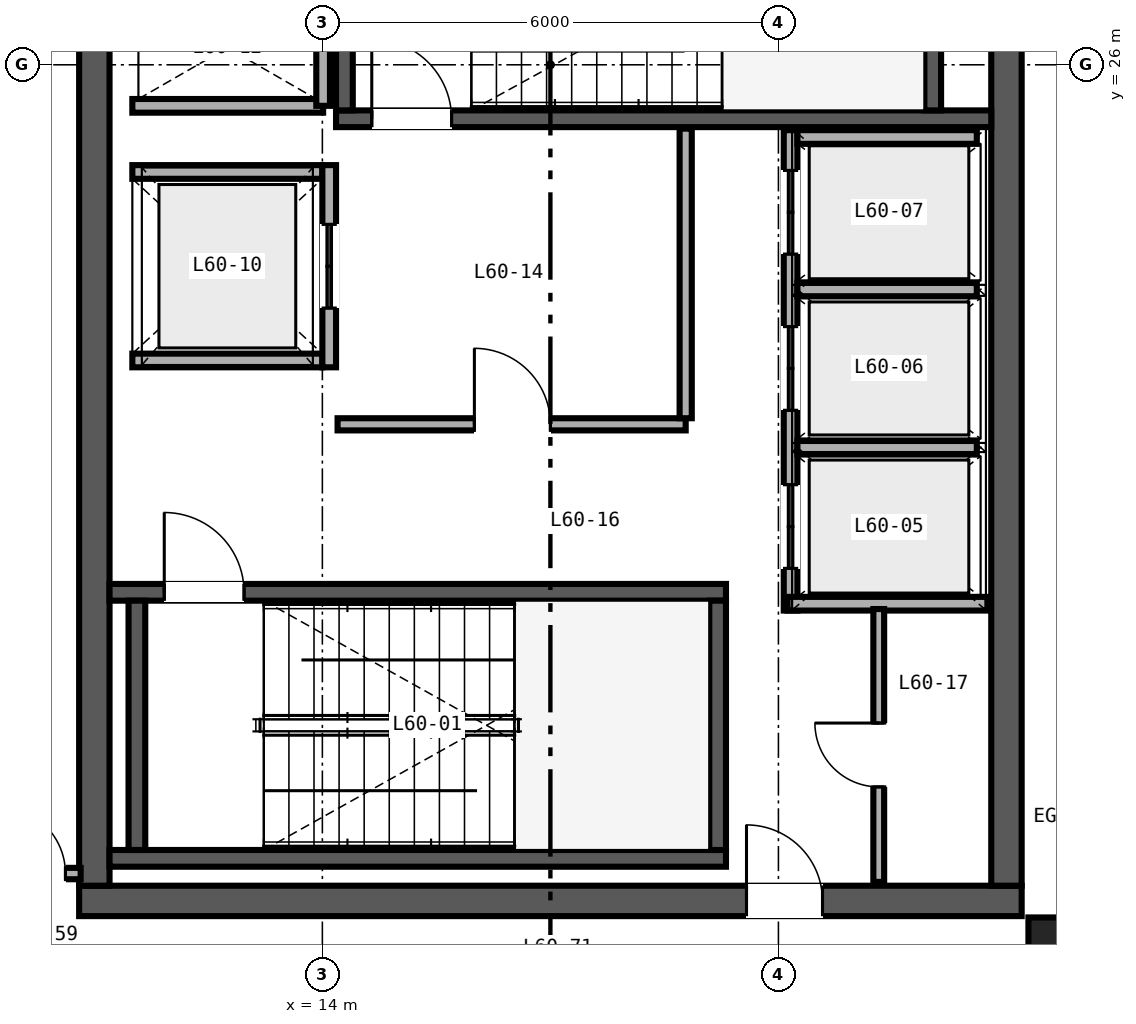
"""IFC4 building model, lengths in metres.
Left out: names, types, materials, properties, quantities, classifications, styles, units other than length and angle.
Written with IfcOpenShell. Run it as: python <this file> out.ifc"""

import sys

from ifc_helpers import new_model, si_unit, direction, frame, frame_2d, origin, origin_2d, place, context, subcontext, project, spatial, rectangle, i_section, extrude, source, transform, mapped, element, fill, save


model = new_model("IFC4")
c1 = context("Model", 3, precision=1e-05, world=origin(), true_north=direction((0.0, 1.0)))
c2 = subcontext(c1, "Body", "Model", "MODEL_VIEW")
j1 = project(units=[si_unit("LENGTHUNIT", "METRE"), si_unit("PLANEANGLEUNIT", "RADIAN")], contexts=[c1])
p1 = place(None, origin())
s1 = spatial("IfcSite", under=j1, at=p1, CompositionType="ELEMENT")
p2 = place(p1, origin())
s2 = spatial("IfcBuilding", under=s1, at=p2, CompositionType="ELEMENT")
p3 = place(p2, frame((0.0, 0.0, 240.0)))
s3 = spatial("IfcBuildingStorey", under=s2, at=p3, CompositionType="ELEMENT", Elevation=240.0)
p4 = place(p3, frame((10.8, 15.0, 0.0), z_axis=(0.0, 0.0, 1.0), x_axis=(1.0, 0.0, 0.0)))
e1 = element("IfcWall", 1, at=p4, inside=s3, PredefinedType="SHEAR", context=c2, shape_type="SweptSolid", body=[
    extrude(rectangle(XDim=12.4, YDim=0.4, at=frame_2d((6.2, 0.0))), origin(), (0.0, 0.0, 1.0), 3.38),
])
p5 = place(p4, frame((8.78, 0.0, 0.0)))
e2 = element("IfcOpeningElement", 2, at=p5, cuts=e1, PredefinedType="OPENING", context=c2, shape_type="SweptSolid", body=[
    extrude(rectangle(XDim=1.0, YDim=2.15, at=frame_2d((0.5, 1.075))), frame((0.0, 0.21, 0.0), z_axis=(0.0, -1.0, 0.0), x_axis=(1.0, 0.0, 0.0)), (0.0, 0.0, 1.0), 0.42),
])
for number, where, z_axis, x_axis in (
    (3, (11.0, 15.2, 0.0), (0.0, 0.0, 1.0), (0.0, 1.0, 0.0)),
    (4, (23.0, 15.2, 0.0), (0.0, 0.0, 1.0), (0.0, 1.0, 0.0)),
):
    element("IfcWall", number, at=place(p3, frame(where, z_axis=z_axis, x_axis=x_axis)), inside=s3, PredefinedType="SHEAR", context=c2, shape_type="SweptSolid", body=[
        extrude(rectangle(XDim=21.6, YDim=0.4, at=frame_2d((10.8, 0.0))), origin(), (0.0, 0.0, 1.0), 3.38),
    ])
p6 = place(p3, frame((11.2, 15.56, 0.0), z_axis=(0.0, 0.0, 1.0), x_axis=(1.0, 0.0, 0.0)))
e5 = element("IfcWall", 5, at=p6, inside=s3, PredefinedType="SHEAR", context=c2, shape_type="SweptSolid", body=[
    extrude(rectangle(XDim=8.11, YDim=0.22, at=frame_2d((4.055, 0.0))), origin(), (0.0, 0.0, 1.0), 3.4),
])
p7 = place(p3, frame((11.2, 19.06, 0.0), z_axis=(0.0, 0.0, 1.0), x_axis=(1.0, 0.0, 0.0)))
e6 = element("IfcWall", 6, at=p7, inside=s3, PredefinedType="SHEAR", context=c2, shape_type="SweptSolid", body=[
    extrude(rectangle(XDim=8.11, YDim=0.22, at=frame_2d((4.055, 0.0))), origin(), (0.0, 0.0, 1.0), 3.4),
])
p8 = place(p7, frame((0.72, 0.0, 0.0)))
e7 = element("IfcOpeningElement", 7, at=p8, cuts=e6, PredefinedType="OPENING", context=c2, shape_type="SweptSolid", body=[
    extrude(rectangle(XDim=1.05, YDim=2.15, at=frame_2d((0.525, 1.075))), frame((0.0, 0.12, 0.0), z_axis=(0.0, -1.0, 0.0), x_axis=(1.0, 0.0, 0.0)), (0.0, 0.0, 1.0), 0.24),
])
for number, where, z_axis, x_axis in (
    (8, (11.56, 15.67, 0.0), (0.0, 0.0, 1.0), (0.0, 1.0, 0.0)),
    (9, (19.2, 15.67, 0.0), (0.0, 0.0, 1.0), (0.0, 1.0, 0.0)),
):
    element("IfcWall", number, at=place(p3, frame(where, z_axis=z_axis, x_axis=x_axis)), inside=s3, PredefinedType="SHEAR", context=c2, shape_type="SweptSolid", body=[
        extrude(rectangle(XDim=3.28, YDim=0.22, at=frame_2d((1.64, 0.0))), origin(), (0.0, 0.0, 1.0), 3.4),
    ])
p9 = place(p3, frame((14.18, 25.29, 0.0), z_axis=(0.0, 0.0, 1.0), x_axis=(1.0, 0.0, 0.0)))
e10 = element("IfcWall", 10, at=p9, inside=s3, PredefinedType="SHEAR", context=c2, shape_type="SweptSolid", body=[
    extrude(rectangle(XDim=8.62, YDim=0.22, at=frame_2d((4.31, 0.0))), origin(), (0.0, 0.0, 1.0), 3.4),
])
p10 = place(p9, frame((0.47, 0.0, 0.0)))
e11 = element("IfcOpeningElement", 11, at=p10, cuts=e10, PredefinedType="OPENING", context=c2, shape_type="SweptSolid", body=[
    extrude(rectangle(XDim=1.05, YDim=2.15, at=frame_2d((0.525, 1.075))), frame((0.0, 0.12, 0.0), z_axis=(0.0, -1.0, 0.0), x_axis=(1.0, 0.0, 0.0)), (0.0, 0.0, 1.0), 0.24),
])
for number, where, z_axis, x_axis in (
    (12, (14.29, 25.4, 0.0), (0.0, 0.0, 1.0), (0.0, 1.0, 0.0)),
    (13, (22.03, 25.4, 0.0), (0.0, 0.0, 1.0), (0.0, 1.0, 0.0)),
):
    element("IfcWall", number, at=place(p3, frame(where, z_axis=z_axis, x_axis=x_axis)), inside=s3, PredefinedType="SHEAR", context=c2, shape_type="SweptSolid", body=[
        extrude(rectangle(XDim=3.28, YDim=0.22, at=frame_2d((1.64, 0.0))), origin(), (0.0, 0.0, 1.0), 3.4),
    ])
m1 = source(origin(), c2, "Body", "SweptSolid", [
    extrude(i_section(OverallWidth=0.422, OverallDepth=0.465, WebThickness=0.045, FlangeThickness=0.073, FilletRadius=0.025, at=origin_2d()), origin(), (0.0, 0.0, 1.0), 3.38),
])
p11 = place(p3, frame((23.5, 14.55, 0.0), z_axis=(0.0, 0.0, 1.0), x_axis=(1.0, 0.0, 0.0)))
e14 = element("IfcColumn", 14, at=p11, inside=s3, PredefinedType="COLUMN", context=c2, shape_type="MappedRepresentation", body=[
    mapped(m1, transform((0.0, 0.0, 0.0), scale=1.0)),
])
p12 = place(p3, frame((20.16, 18.82, 0.0), z_axis=(0.0, 0.0, 1.0), x_axis=(0.0, 1.0, 0.0)))
e15 = element("IfcWall", 15, at=p12, inside=s3, PredefinedType="SOLIDWALL", context=c2, shape_type="SweptSolid", body=[
    extrude(rectangle(XDim=6.32, YDim=0.18, at=frame_2d((3.16, 0.0))), origin(), (0.0, 0.0, 1.0), 2.48),
])
p13 = place(p12, frame((0.555, 0.0, 0.0)))
e16 = element("IfcOpeningElement", 16, at=p13, cuts=e15, PredefinedType="OPENING", context=c2, shape_type="SweptSolid", body=[
    extrude(rectangle(XDim=1.1, YDim=2.2, at=frame_2d((0.55, 1.1))), frame((0.0, 0.1, 0.0), z_axis=(0.0, -1.0, 0.0), x_axis=(1.0, 0.0, 0.0)), (0.0, 0.0, 1.0), 0.2),
])
p14 = place(p12, frame((2.635, 0.0, 0.0)))
e17 = element("IfcOpeningElement", 17, at=p14, cuts=e15, PredefinedType="OPENING", context=c2, shape_type="SweptSolid", body=[
    extrude(rectangle(XDim=1.1, YDim=2.2, at=frame_2d((0.55, 1.1))), frame((0.0, 0.1, 0.0), z_axis=(0.0, -1.0, 0.0), x_axis=(1.0, 0.0, 0.0)), (0.0, 0.0, 1.0), 0.2),
])
p15 = place(p12, frame((4.69, 0.0, 0.0)))
e18 = element("IfcOpeningElement", 18, at=p15, cuts=e15, PredefinedType="OPENING", context=c2, shape_type="SweptSolid", body=[
    extrude(rectangle(XDim=1.1, YDim=2.2, at=frame_2d((0.55, 1.1))), frame((0.0, 0.1, 0.0), z_axis=(0.0, -1.0, 0.0), x_axis=(1.0, 0.0, 0.0)), (0.0, 0.0, 1.0), 0.2),
])
p16 = place(p3, frame((20.12, 18.91, 0.0), z_axis=(0.0, 0.0, 1.0), x_axis=(1.0, 0.0, 0.0)))
e19 = element("IfcWall", 19, at=p16, inside=s3, PredefinedType="SOLIDWALL", context=c2, shape_type="SweptSolid", body=[
    extrude(rectangle(XDim=2.63, YDim=0.18, at=frame_2d((1.315, 0.0))), origin(), (0.0, 0.0, 1.0), 3.38),
])
p17 = place(p3, frame((20.25, 25.05, 0.0), z_axis=(0.0, 0.0, 1.0), x_axis=(1.0, 0.0, 0.0)))
e20 = element("IfcWall", 20, at=p17, inside=s3, PredefinedType="SOLIDWALL", context=c2, shape_type="SweptSolid", body=[
    extrude(rectangle(XDim=2.36, YDim=0.18, at=frame_2d((1.18, 0.0))), origin(), (0.0, 0.0, 1.0), 3.38),
])
p18 = place(p3, frame((20.25, 20.965, 0.0), z_axis=(0.0, 0.0, 1.0), x_axis=(1.0, 0.0, 0.0)))
e21 = element("IfcWall", 21, at=p18, inside=s3, PredefinedType="SOLIDWALL", context=c2, shape_type="SweptSolid", body=[
    extrude(rectangle(XDim=2.36, YDim=0.18, at=frame_2d((1.18, 0.0))), origin(), (0.0, 0.0, 1.0), 2.48),
])
p19 = place(p3, frame((20.25, 23.045, 0.0), z_axis=(0.0, 0.0, 1.0), x_axis=(1.0, 0.0, 0.0)))
e22 = element("IfcWall", 22, at=p19, inside=s3, PredefinedType="SOLIDWALL", context=c2, shape_type="SweptSolid", body=[
    extrude(rectangle(XDim=2.36, YDim=0.18, at=frame_2d((1.18, 0.0))), origin(), (0.0, 0.0, 1.0), 3.38),
])
for number, where, z_axis, x_axis in (
    (23, (11.5, 22.11, 0.0), (0.0, 0.0, 1.0), (1.0, 0.0, 0.0)),
    (24, (11.5, 24.59, 0.0), (0.0, 0.0, 1.0), (1.0, 0.0, 0.0)),
):
    element("IfcWall", number, at=place(p3, frame(where, z_axis=z_axis, x_axis=x_axis)), inside=s3, PredefinedType="SOLIDWALL", context=c2, shape_type="SweptSolid", body=[
        extrude(rectangle(XDim=2.5, YDim=0.18, at=frame_2d((1.25, 0.0))), origin(), (0.0, 0.0, 1.0), 3.38),
    ])
p20 = place(p3, frame((14.09, 22.02, 0.0), z_axis=(0.0, 0.0, 1.0), x_axis=(0.0, 1.0, 0.0)))
e25 = element("IfcWall", 25, at=p20, inside=s3, PredefinedType="SOLIDWALL", context=c2, shape_type="SweptSolid", body=[
    extrude(rectangle(XDim=2.66, YDim=0.18, at=frame_2d((1.33, 0.0))), origin(), (0.0, 0.0, 1.0), 3.38),
])
p21 = place(p20, frame((0.78, 0.0, 0.0)))
e26 = element("IfcOpeningElement", 26, at=p21, cuts=e25, PredefinedType="OPENING", context=c2, shape_type="SweptSolid", body=[
    extrude(rectangle(XDim=1.1, YDim=2.2, at=frame_2d((0.55, 1.1))), frame((0.0, 0.1, 0.0), z_axis=(0.0, -1.0, 0.0), x_axis=(1.0, 0.0, 0.0)), (0.0, 0.0, 1.0), 0.2),
])
p22 = place(p3, frame((11.5, 25.46, 0.0), z_axis=(0.0, 0.0, 1.0), x_axis=(1.0, 0.0, 0.0)))
e27 = element("IfcWall", 27, at=p22, inside=s3, PredefinedType="SOLIDWALL", context=c2, shape_type="SweptSolid", body=[
    extrude(rectangle(XDim=2.51, YDim=0.18, at=frame_2d((1.255, 0.0))), origin(), (0.0, 0.0, 1.0), 3.38),
])
p23 = place(p3, frame((14.01, 25.46, 0.0), z_axis=(0.0, 0.0, 1.0), x_axis=(0.0, 1.0, 0.0)))
e28 = element("IfcWall", 28, at=p23, inside=s3, PredefinedType="SOLIDWALL", context=c2, shape_type="SweptSolid", body=[
    extrude(rectangle(XDim=3.08, YDim=0.18, at=frame_2d((1.54, 0.0))), origin(), (0.0, 0.0, 1.0), 3.38),
])
p24 = place(p3, frame((14.2, 21.27, 0.0), z_axis=(0.0, 0.0, 1.0), x_axis=(1.0, 0.0, 0.0)))
e29 = element("IfcWall", 29, at=p24, inside=s3, PredefinedType="PARTITIONING", context=c2, shape_type="SweptSolid", body=[
    extrude(rectangle(XDim=4.58, YDim=0.16, at=frame_2d((2.29, 0.0))), origin(), (0.0, 0.0, 1.0), 3.38),
])
p25 = place(p24, frame((1.8, 0.0, 0.0)))
e30 = element("IfcOpeningElement", 30, at=p25, cuts=e29, PredefinedType="OPENING", context=c2, shape_type="SweptSolid", body=[
    extrude(rectangle(XDim=1.0, YDim=2.15, at=frame_2d((0.5, 1.075))), frame((0.0, 0.09, 0.0), z_axis=(0.0, -1.0, 0.0), x_axis=(1.0, 0.0, 0.0)), (0.0, 0.0, 1.0), 0.18),
])
p26 = place(p3, frame((18.78, 21.35, 0.0), z_axis=(0.0, 0.0, 1.0), x_axis=(0.0, 1.0, 0.0)))
e31 = element("IfcWall", 31, at=p26, inside=s3, PredefinedType="PARTITIONING", context=c2, shape_type="SweptSolid", body=[
    extrude(rectangle(XDim=3.81, YDim=0.16, at=frame_2d((1.905, 0.0))), origin(), (0.0, 0.0, 1.0), 3.38),
])
p27 = place(p3, frame((21.32, 15.25, 0.0), z_axis=(0.0, 0.0, 1.0), x_axis=(0.0, 1.0, 0.0)))
e32 = element("IfcWall", 32, at=p27, inside=s3, PredefinedType="PARTITIONING", context=c2, shape_type="SweptSolid", body=[
    extrude(rectangle(XDim=3.59, YDim=0.142, at=frame_2d((1.795, 0.0))), origin(), (0.0, 0.0, 1.0), 3.38),
])
p28 = place(p27, frame((1.25, 0.0, 0.0)))
e33 = element("IfcOpeningElement", 33, at=p28, cuts=e32, PredefinedType="OPENING", context=c2, shape_type="SweptSolid", body=[
    extrude(rectangle(XDim=0.84, YDim=2.1, at=frame_2d((0.42, 1.05))), frame((0.0, 0.081, 0.0), z_axis=(0.0, -1.0, 0.0), x_axis=(1.0, 0.0, 0.0)), (0.0, 0.0, 1.0), 0.162),
])
p29 = place(p3, frame((8.16, 15.36, 0.0), z_axis=(0.0, 0.0, 1.0), x_axis=(1.0, 0.0, 0.0)))
e34 = element("IfcWall", 34, at=p29, inside=s3, PredefinedType="PARTITIONING", context=c2, shape_type="SweptSolid", body=[
    extrude(rectangle(XDim=2.66, YDim=0.15, at=frame_2d((1.33, 0.0))), origin(), (0.0, 0.0, 1.0), 2.601),
])
p30 = place(p29, frame((1.58, 0.0, 0.0)))
e35 = element("IfcOpeningElement", 35, at=p30, cuts=e34, PredefinedType="OPENING", context=c2, shape_type="SweptSolid", body=[
    extrude(rectangle(XDim=0.88, YDim=2.15, at=frame_2d((0.44, 1.075))), frame((0.0, 0.085, 0.0), z_axis=(0.0, -1.0, 0.0), x_axis=(1.0, 0.0, 0.0)), (0.0, 0.0, 1.0), 0.17),
])
m2 = source(origin(), c2, "Body", "SweptSolid", [
    extrude(rectangle(XDim=1.05, YDim=2.15, at=frame_2d((0.525, 1.075))), frame((0.0, 0.025, 0.0), z_axis=(0.0, -1.0, 0.0), x_axis=(1.0, 0.0, 0.0)), (0.0, 0.0, 1.0), 0.05),
])
p31 = place(p8, origin())
e36 = element("IfcDoor", 36, at=p31, inside=s3, OperationType="SINGLE_SWING_LEFT", PredefinedType="DOOR", context=c2, shape_type="MappedRepresentation", body=[
    mapped(m2, transform((0.0, 0.0, 0.0), scale=1.0)),
])
fill(e7, e36)
p32 = place(p10, origin())
e37 = element("IfcDoor", 37, at=p32, inside=s3, OperationType="SINGLE_SWING_LEFT", PredefinedType="DOOR", context=c2, shape_type="MappedRepresentation", body=[
    mapped(m2, transform((0.0, 0.0, 0.0), scale=1.0)),
])
fill(e11, e37)
m3 = source(origin(), c2, "Body", "SweptSolid", [
    extrude(rectangle(XDim=1.1, YDim=2.2, at=frame_2d((0.55, 1.1))), frame((0.0, 0.025, 0.0), z_axis=(0.0, -1.0, 0.0), x_axis=(1.0, 0.0, 0.0)), (0.0, 0.0, 1.0), 0.05),
])
p33 = place(p13, origin())
e38 = element("IfcDoor", 38, at=p33, inside=s3, OperationType="DOUBLE_DOOR_SLIDING", PredefinedType="DOOR", context=c2, shape_type="MappedRepresentation", body=[
    mapped(m3, transform((0.0, 0.0, 0.0), scale=1.0)),
])
fill(e16, e38)
p34 = place(p14, origin())
e39 = element("IfcDoor", 39, at=p34, inside=s3, OperationType="DOUBLE_DOOR_SLIDING", PredefinedType="DOOR", context=c2, shape_type="MappedRepresentation", body=[
    mapped(m3, transform((0.0, 0.0, 0.0), scale=1.0)),
])
fill(e17, e39)
p35 = place(p15, origin())
e40 = element("IfcDoor", 40, at=p35, inside=s3, OperationType="DOUBLE_DOOR_SLIDING", PredefinedType="DOOR", context=c2, shape_type="MappedRepresentation", body=[
    mapped(m3, transform((0.0, 0.0, 0.0), scale=1.0)),
])
fill(e18, e40)
p36 = place(p21, origin())
e41 = element("IfcDoor", 41, at=p36, inside=s3, OperationType="DOUBLE_DOOR_SLIDING", PredefinedType="DOOR", context=c2, shape_type="MappedRepresentation", body=[
    mapped(m3, transform((0.0, 0.0, 0.0), scale=1.0)),
])
fill(e26, e41)
m4 = source(origin(), c2, "Body", "SweptSolid", [
    extrude(rectangle(XDim=1.0, YDim=2.15, at=frame_2d((0.5, 1.075))), frame((0.0, 0.025, 0.0), z_axis=(0.0, -1.0, 0.0), x_axis=(1.0, 0.0, 0.0)), (0.0, 0.0, 1.0), 0.05),
])
p37 = place(p25, origin())
e42 = element("IfcDoor", 42, at=p37, inside=s3, OperationType="SINGLE_SWING_LEFT", PredefinedType="DOOR", context=c2, shape_type="MappedRepresentation", body=[
    mapped(m4, transform((0.0, 0.0, 0.0), scale=1.0)),
])
fill(e30, e42)
m5 = source(origin(), c2, "Body", "SweptSolid", [
    extrude(rectangle(XDim=0.84, YDim=2.1, at=frame_2d((0.42, 1.05))), frame((0.0, 0.025, 0.0), z_axis=(0.0, -1.0, 0.0), x_axis=(1.0, 0.0, 0.0)), (0.0, 0.0, 1.0), 0.05),
])
p38 = place(p28, origin())
e43 = element("IfcDoor", 43, at=p38, inside=s3, OperationType="SINGLE_SWING_RIGHT", PredefinedType="DOOR", context=c2, shape_type="MappedRepresentation", body=[
    mapped(m5, transform((0.0, 0.0, 0.0), scale=1.0)),
])
fill(e33, e43)
p39 = place(p5, origin())
e44 = element("IfcDoor", 44, at=p39, inside=s3, OperationType="SINGLE_SWING_LEFT", PredefinedType="DOOR", context=c2, shape_type="MappedRepresentation", body=[
    mapped(m4, transform((0.0, 0.0, 0.0), scale=1.0)),
])
fill(e2, e44)
m6 = source(origin(), c2, "Body", "SweptSolid", [
    extrude(rectangle(XDim=0.88, YDim=2.15, at=frame_2d((0.44, 1.075))), frame((0.0, 0.025, 0.0), z_axis=(0.0, -1.0, 0.0), x_axis=(1.0, 0.0, 0.0)), (0.0, 0.0, 1.0), 0.05),
])
p40 = place(p30, origin())
e45 = element("IfcDoor", 45, at=p40, inside=s3, OperationType="SINGLE_SWING_LEFT", PredefinedType="DOOR", context=c2, shape_type="MappedRepresentation", body=[
    mapped(m6, transform((0.0, 0.0, 0.0), scale=1.0)),
])
fill(e35, e45)
save(model, sys.argv[1])
